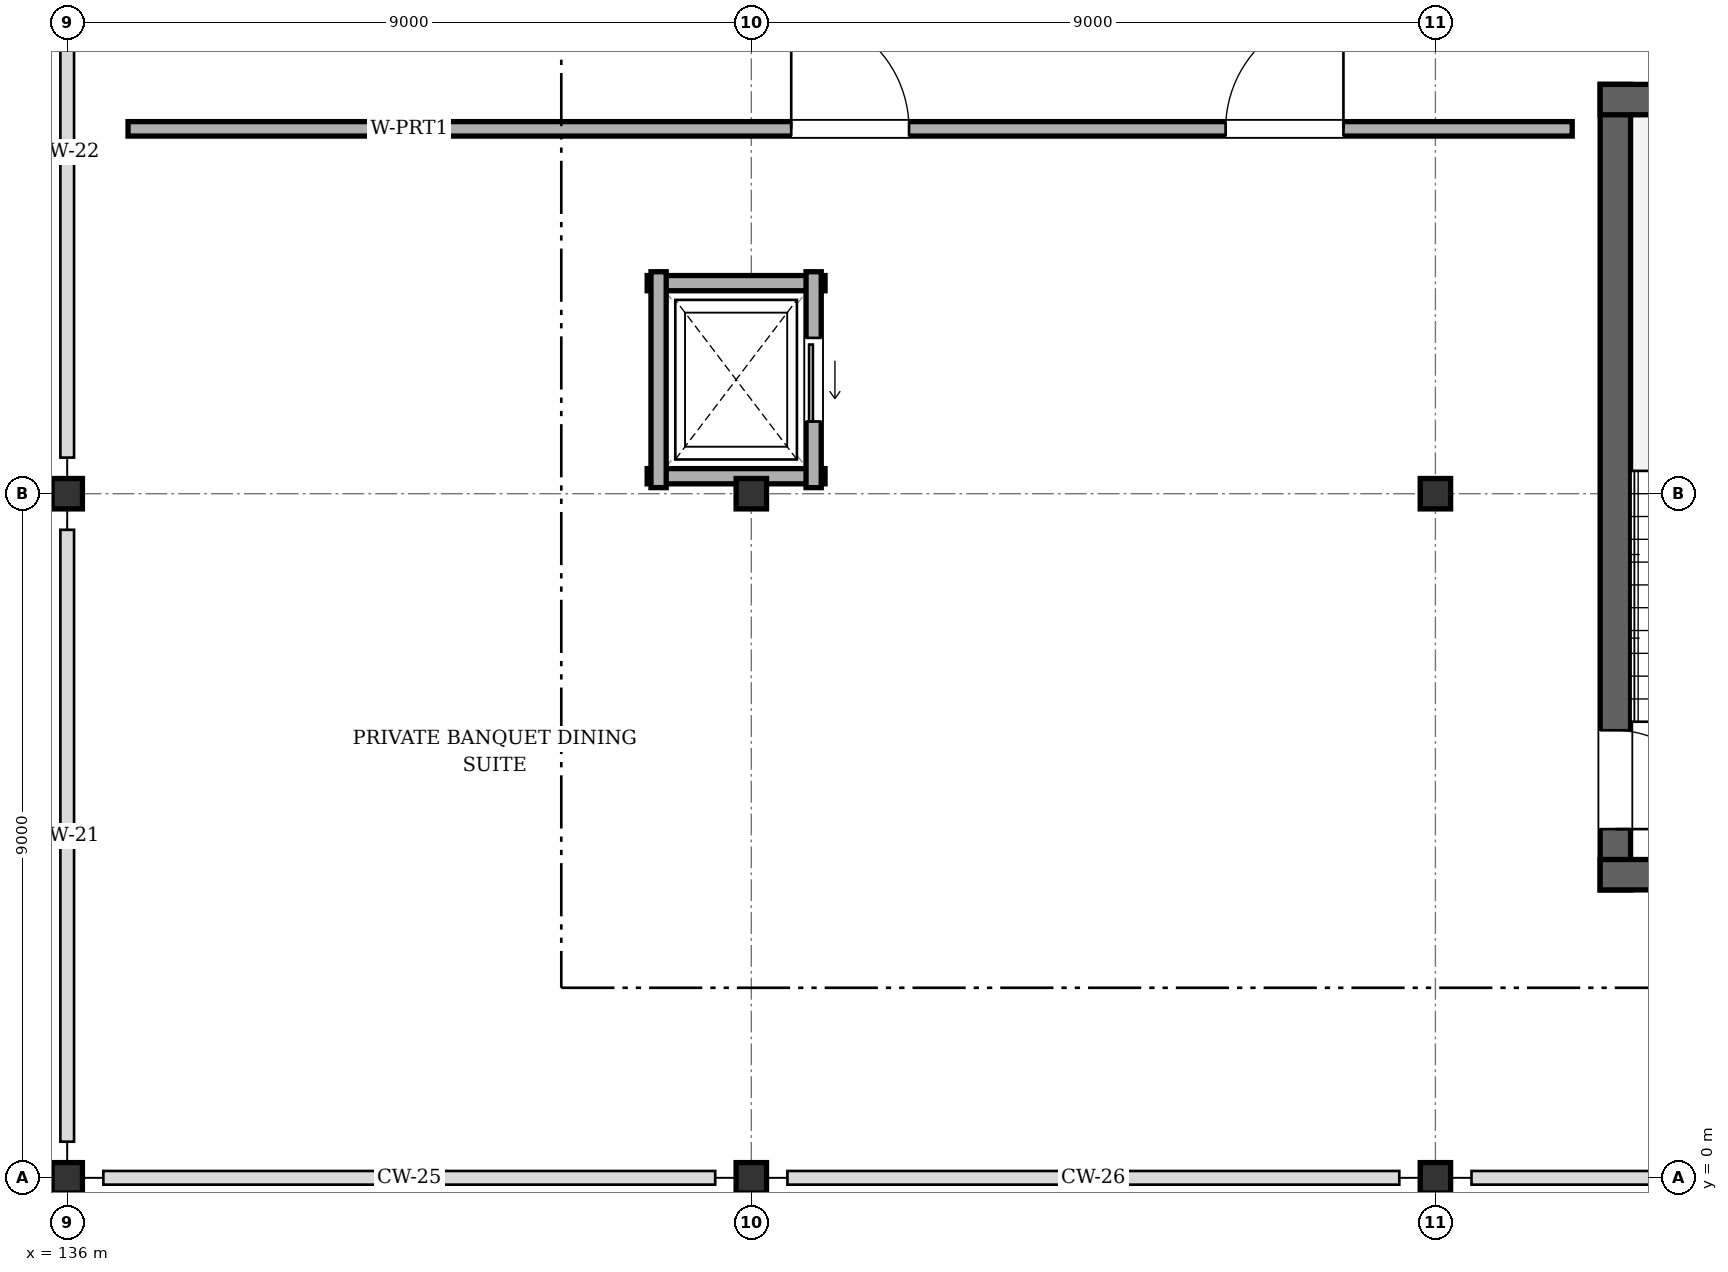
"""IFC4 building model, lengths in metres.
Left out: names, types, materials, properties, quantities, classifications, styles, units other than length and angle.
Written with IfcOpenShell. Run it as: python <this file> out.ifc"""

import sys

from ifc_helpers import new_model, si_unit, direction, frame, frame_2d, origin, origin_2d, place, context, subcontext, project, spatial, rectangle, i_section, extrude, element, fill, save


model = new_model("IFC4")
c1 = context("Model", 3, precision=1e-05, world=origin(), true_north=direction((0.0, 1.0)))
c2 = subcontext(c1, "Body", "Model", "MODEL_VIEW")
j1 = project(units=[si_unit("LENGTHUNIT", "METRE"), si_unit("PLANEANGLEUNIT", "RADIAN")], contexts=[c1])
p1 = place(None, origin())
s1 = spatial("IfcSite", under=j1, at=p1, CompositionType="ELEMENT")
p2 = place(p1, origin())
s2 = spatial("IfcBuilding", under=s1, at=p2, CompositionType="ELEMENT")
p3 = place(p2, frame((0.0, 0.0, 10.8)))
s3 = spatial("IfcBuildingStorey", under=s2, at=p3, CompositionType="ELEMENT", Elevation=10.8)
for number, where, z_axis, x_axis in (
    (1, (136.0, 0.0, 0.0), (0.0, 0.0, 1.0), (1.0, 0.0, 0.0)),
    (2, (136.0, 9.0, 0.0), (0.0, 0.0, 1.0), (1.0, 0.0, 0.0)),
    (3, (145.0, 0.0, 0.0), (0.0, 0.0, 1.0), (1.0, 0.0, 0.0)),
    (4, (145.0, 9.0, 0.0), (0.0, 0.0, 1.0), (1.0, 0.0, 0.0)),
    (5, (154.0, 0.0, 0.0), (0.0, 0.0, 1.0), (1.0, 0.0, 0.0)),
    (6, (154.0, 9.0, 0.0), (0.0, 0.0, 1.0), (1.0, 0.0, 0.0)),
):
    element("IfcColumn", number, at=place(p3, frame(where, z_axis=z_axis, x_axis=x_axis)), inside=s3, PredefinedType="COLUMN", context=c2, shape_type="SweptSolid", body=[
        extrude(i_section(OverallWidth=0.4, OverallDepth=0.4, WebThickness=0.013, FlangeThickness=0.021, FilletRadius=0.022, at=origin_2d()), origin(), (0.0, 0.0, 1.0), 3.6),
    ])
p4 = place(p3, frame((156.367, 14.385, 0.0), z_axis=(0.0, 0.0, 1.0), x_axis=(0.0, -1.0, 0.0)))
e7 = element("IfcWall", 7, at=p4, inside=s3, PredefinedType="SHEAR", context=c2, shape_type="SweptSolid", body=[
    extrude(rectangle(XDim=10.597, YDim=0.4, at=frame_2d((5.299, 0.0))), origin(), (0.0, 0.0, 1.0), 3.4),
])
p5 = place(p4, frame((8.498, 0.0, 0.0)))
e8 = element("IfcOpeningElement", 8, at=p5, cuts=e7, PredefinedType="OPENING", context=c2, shape_type="SweptSolid", body=[
    extrude(rectangle(XDim=1.3, YDim=2.1, at=frame_2d((0.65, 1.05))), frame((0.0, 0.21, 0.0), z_axis=(0.0, -1.0, 0.0), x_axis=(1.0, 0.0, 0.0)), (0.0, 0.0, 1.0), 0.42),
])
for number, where, z_axis, x_axis in (
    (9, (160.587, 14.185, 0.0), (0.0, 0.0, 1.0), (-1.0, 0.0, 0.0)),
    (10, (156.167, 3.988, 0.0), (0.0, 0.0, 1.0), (1.0, 0.0, 0.0)),
):
    element("IfcWall", number, at=place(p3, frame(where, z_axis=z_axis, x_axis=x_axis)), inside=s3, PredefinedType="SHEAR", context=c2, shape_type="SweptSolid", body=[
        extrude(rectangle(XDim=4.42, YDim=0.4, at=frame_2d((2.21, 0.0))), origin(), (0.0, 0.0, 1.0), 3.4),
    ])
p6 = place(p3, frame((143.63, 9.23, 0.0), z_axis=(0.0, 0.0, 1.0), x_axis=(1.0, 0.0, 0.0)))
e11 = element("IfcWall", 11, at=p6, inside=s3, PredefinedType="SOLIDWALL", context=c2, shape_type="SweptSolid", body=[
    extrude(rectangle(XDim=2.34, YDim=0.2, at=frame_2d((1.17, 0.0))), origin(), (0.0, 0.0, 1.0), 2.935),
])
p7 = place(p3, frame((145.97, 11.77, 0.0), z_axis=(0.0, 0.0, 1.0), x_axis=(-1.0, 0.0, 0.0)))
e12 = element("IfcWall", 12, at=p7, inside=s3, PredefinedType="SOLIDWALL", context=c2, shape_type="SweptSolid", body=[
    extrude(rectangle(XDim=2.34, YDim=0.2, at=frame_2d((1.17, 0.0))), origin(), (0.0, 0.0, 1.0), 3.375),
])
p8 = place(p3, frame((143.78, 11.92, 0.0), z_axis=(0.0, 0.0, 1.0), x_axis=(0.0, -1.0, 0.0)))
e13 = element("IfcWall", 13, at=p8, inside=s3, PredefinedType="SOLIDWALL", context=c2, shape_type="SweptSolid", body=[
    extrude(rectangle(XDim=2.84, YDim=0.2, at=frame_2d((1.42, 0.0))), origin(), (0.0, 0.0, 1.0), 2.935),
])
p9 = place(p3, frame((145.82, 9.08, 0.0), z_axis=(0.0, 0.0, 1.0), x_axis=(0.0, 1.0, 0.0)))
e14 = element("IfcWall", 14, at=p9, inside=s3, PredefinedType="SOLIDWALL", context=c2, shape_type="SweptSolid", body=[
    extrude(rectangle(XDim=2.84, YDim=0.2, at=frame_2d((1.42, 0.0))), origin(), (0.0, 0.0, 1.0), 2.935),
])
p10 = place(p9, frame((0.87, 0.0, 0.0)))
e15 = element("IfcOpeningElement", 15, at=p10, cuts=e14, PredefinedType="OPENING", context=c2, shape_type="SweptSolid", body=[
    extrude(rectangle(XDim=1.1, YDim=2.15, at=frame_2d((0.55, 1.075))), frame((0.0, 0.11, 0.0), z_axis=(0.0, -1.0, 0.0), x_axis=(1.0, 0.0, 0.0)), (0.0, 0.0, 1.0), 0.22),
])
p11 = place(p3, frame((136.8, 13.8, 0.0), z_axis=(0.0, 0.0, 1.0), x_axis=(1.0, 0.0, 0.0)))
e16 = element("IfcWall", 16, at=p11, inside=s3, PredefinedType="PARTITIONING", context=c2, shape_type="SweptSolid", body=[
    extrude(rectangle(XDim=19.0, YDim=0.19, at=frame_2d((9.5, 0.0))), origin(), (0.0, 0.0, 1.0), 2.985),
])
p12 = place(p11, frame((8.725, 0.0, 0.0)))
e17 = element("IfcOpeningElement", 17, at=p12, cuts=e16, PredefinedType="OPENING", context=c2, shape_type="SweptSolid", body=[
    extrude(rectangle(XDim=1.55, YDim=2.1, at=frame_2d((0.775, 1.05))), frame((0.0, 0.105, 0.0), z_axis=(0.0, -1.0, 0.0), x_axis=(1.0, 0.0, 0.0)), (0.0, 0.0, 1.0), 0.21),
])
p13 = place(p11, frame((14.44, 0.0, 0.0)))
e18 = element("IfcOpeningElement", 18, at=p13, cuts=e16, PredefinedType="OPENING", context=c2, shape_type="SweptSolid", body=[
    extrude(rectangle(XDim=1.55, YDim=2.1, at=frame_2d((0.775, 1.05))), frame((0.0, 0.105, 0.0), z_axis=(0.0, -1.0, 0.0), x_axis=(1.0, 0.0, 0.0)), (0.0, 0.0, 1.0), 0.21),
])
p14 = place(p5, origin())
e19 = element("IfcDoor", 19, at=p14, inside=s3, OperationType="SINGLE_SWING_RIGHT", PredefinedType="DOOR", context=c2, shape_type="SweptSolid", body=[
    extrude(rectangle(XDim=1.3, YDim=2.1, at=frame_2d((0.65, 1.05))), frame((0.0, 0.025, 0.0), z_axis=(0.0, -1.0, 0.0), x_axis=(1.0, 0.0, 0.0)), (0.0, 0.0, 1.0), 0.05),
])
fill(e8, e19)
p15 = place(p10, origin())
e20 = element("IfcDoor", 20, at=p15, inside=s3, OperationType="SLIDING_TO_LEFT", PredefinedType="DOOR", context=c2, shape_type="SweptSolid", body=[
    extrude(rectangle(XDim=1.1, YDim=2.15, at=frame_2d((0.55, 1.075))), frame((0.0, 0.025, 0.0), z_axis=(0.0, -1.0, 0.0), x_axis=(1.0, 0.0, 0.0)), (0.0, 0.0, 1.0), 0.05),
])
fill(e15, e20)
p16 = place(p12, origin())
e21 = element("IfcDoor", 21, at=p16, inside=s3, OperationType="SINGLE_SWING_LEFT", PredefinedType="DOOR", context=c2, shape_type="SweptSolid", body=[
    extrude(rectangle(XDim=1.55, YDim=2.1, at=frame_2d((0.775, 1.05))), frame((0.0, 0.025, 0.0), z_axis=(0.0, -1.0, 0.0), x_axis=(1.0, 0.0, 0.0)), (0.0, 0.0, 1.0), 0.05),
])
fill(e17, e21)
p17 = place(p13, origin())
e22 = element("IfcDoor", 22, at=p17, inside=s3, OperationType="SINGLE_SWING_RIGHT", PredefinedType="DOOR", context=c2, shape_type="SweptSolid", body=[
    extrude(rectangle(XDim=1.55, YDim=2.1, at=frame_2d((0.775, 1.05))), frame((0.0, 0.025, 0.0), z_axis=(0.0, -1.0, 0.0), x_axis=(1.0, 0.0, 0.0)), (0.0, 0.0, 1.0), 0.05),
])
fill(e18, e22)
save(model, sys.argv[1])
